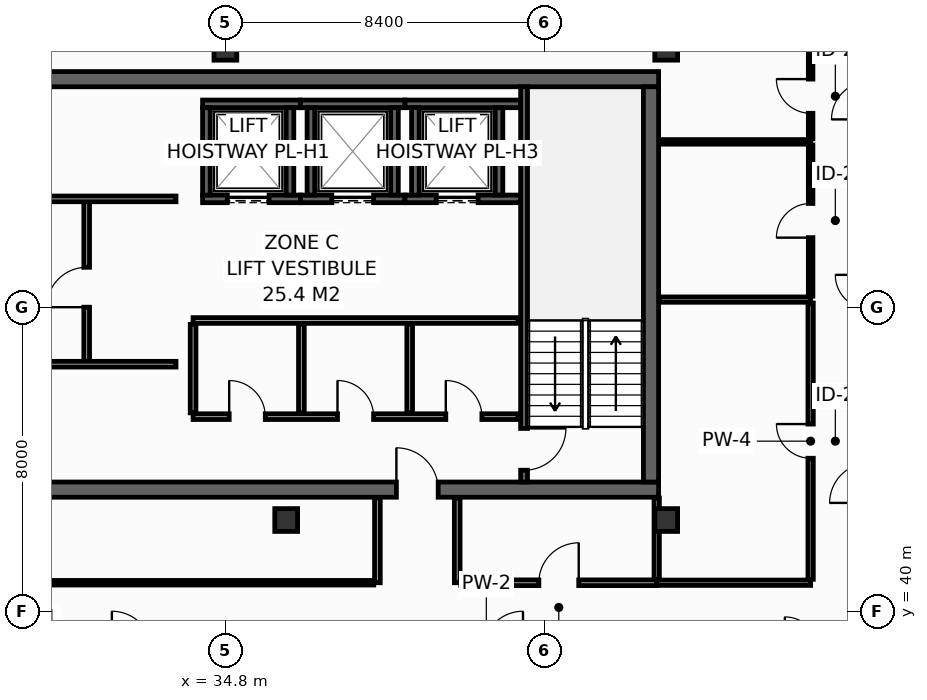
"""IFC4 building model, lengths in metres.
Left out: names, types, materials, properties, quantities, classifications, styles, units other than length and angle.
Written with IfcOpenShell. Run it as: python <this file> out.ifc"""

import sys

from ifc_helpers import new_model, si_unit, direction, frame, frame_2d, origin, origin_2d, place, context, subcontext, project, spatial, rectangle, hollow_rectangle, extrude, element, fill, save


model = new_model("IFC4")
c1 = context("Model", 3, precision=1e-05, world=origin(), true_north=direction((0.0, 1.0)))
c2 = subcontext(c1, "Body", "Model", "MODEL_VIEW")
j1 = project(units=[si_unit("LENGTHUNIT", "METRE"), si_unit("PLANEANGLEUNIT", "RADIAN")], contexts=[c1])
p1 = place(None, origin())
s1 = spatial("IfcSite", under=j1, at=p1, CompositionType="ELEMENT")
p2 = place(p1, origin())
s2 = spatial("IfcBuilding", under=s1, at=p2, CompositionType="ELEMENT")
p3 = place(p2, frame((0.0, 0.0, 268.6)))
s3 = spatial("IfcBuildingStorey", under=s2, at=p3, CompositionType="ELEMENT", Elevation=268.6)
p4 = place(p3, frame((13.7, 43.2, 0.0), z_axis=(0.0, 0.0, 1.0), x_axis=(1.0, 0.0, 0.0)))
e1 = element("IfcWall", 1, at=p4, inside=s3, PredefinedType="SHEAR", context=c2, shape_type="SweptSolid", body=[
    extrude(rectangle(XDim=32.5, YDim=0.4, at=frame_2d((16.25, 0.0))), origin(), (0.0, 0.0, 1.0), 3.55),
])
p5 = place(p4, frame((5.4, 0.0, 0.0)))
e2 = element("IfcOpeningElement", 2, at=p5, cuts=e1, PredefinedType="OPENING", context=c2, shape_type="SweptSolid", body=[
    extrude(rectangle(XDim=1.1, YDim=2.15, at=frame_2d((0.55, 1.075))), frame((0.0, 0.21, 0.0), z_axis=(0.0, -1.0, 0.0), x_axis=(1.0, 0.0, 0.0)), (0.0, 0.0, 1.0), 0.42),
])
p6 = place(p4, frame((25.6, 0.0, 0.0)))
e3 = element("IfcOpeningElement", 3, at=p6, cuts=e1, PredefinedType="OPENING", context=c2, shape_type="SweptSolid", body=[
    extrude(rectangle(XDim=1.1, YDim=2.15, at=frame_2d((0.55, 1.075))), frame((0.0, 0.21, 0.0), z_axis=(0.0, -1.0, 0.0), x_axis=(1.0, 0.0, 0.0)), (0.0, 0.0, 1.0), 0.42),
])
p7 = place(p3, frame((13.7, 54.0, 0.0), z_axis=(0.0, 0.0, 1.0), x_axis=(1.0, 0.0, 0.0)))
e4 = element("IfcWall", 4, at=p7, inside=s3, PredefinedType="SHEAR", context=c2, shape_type="SweptSolid", body=[
    extrude(rectangle(XDim=32.5, YDim=0.4, at=frame_2d((16.25, 0.0))), origin(), (0.0, 0.0, 1.0), 3.55),
])
p8 = place(p3, frame((46.0, 43.4, 0.0), z_axis=(0.0, 0.0, 1.0), x_axis=(0.0, 1.0, 0.0)))
e5 = element("IfcWall", 5, at=p8, inside=s3, PredefinedType="SHEAR", context=c2, shape_type="SweptSolid", body=[
    extrude(rectangle(XDim=10.4, YDim=0.4, at=frame_2d((5.2, 0.0))), origin(), (0.0, 0.0, 1.0), 3.55),
])
for number, where, z_axis, x_axis in (
    (6, (34.8, 54.8, 0.0), (0.0, 0.0, 1.0), (1.0, 0.0, 0.0)),
    (7, (46.4, 54.8, 0.0), (0.0, 0.0, 1.0), (1.0, 0.0, 0.0)),
    (8, (36.4, 42.4, 0.0), (0.0, 0.0, 1.0), (1.0, 0.0, 0.0)),
    (9, (46.4, 42.4, 0.0), (0.0, 0.0, 1.0), (1.0, 0.0, 0.0)),
):
    element("IfcColumn", number, at=place(p3, frame(where, z_axis=z_axis, x_axis=x_axis)), inside=s3, PredefinedType="COLUMN", context=c2, shape_type="SweptSolid", body=[
        extrude(hollow_rectangle(XDim=0.6, YDim=0.6, WallThickness=0.028, at=origin_2d()), origin(), (0.0, 0.0, 1.0), 3.8),
    ])
p9 = place(p3, frame((34.2, 50.85, 0.0), z_axis=(0.0, 0.0, 1.0), x_axis=(1.0, 0.0, 0.0)))
e10 = element("IfcWall", 10, at=p9, inside=s3, PredefinedType="SHEAR", context=c2, shape_type="SweptSolid", body=[
    extrude(rectangle(XDim=2.575, YDim=0.2, at=frame_2d((1.288, 0.0))), origin(), (0.0, 0.0, 1.0), 3.55),
])
p10 = place(p9, frame((0.65, 0.0, 0.0)))
e11 = element("IfcOpeningElement", 11, at=p10, cuts=e10, PredefinedType="OPENING", context=c2, shape_type="SweptSolid", body=[
    extrude(rectangle(XDim=1.1, YDim=2.2, at=frame_2d((0.55, 1.1))), frame((0.0, 0.11, 0.0), z_axis=(0.0, -1.0, 0.0), x_axis=(1.0, 0.0, 0.0)), (0.0, 0.0, 1.0), 0.22),
])
p11 = place(p3, frame((34.2, 53.35, 0.0), z_axis=(0.0, 0.0, 1.0), x_axis=(1.0, 0.0, 0.0)))
e12 = element("IfcWall", 12, at=p11, inside=s3, PredefinedType="SHEAR", context=c2, shape_type="SweptSolid", body=[
    extrude(rectangle(XDim=2.575, YDim=0.2, at=frame_2d((1.288, 0.0))), origin(), (0.0, 0.0, 1.0), 3.55),
])
for number, where, z_axis, x_axis in (
    (13, (34.3, 50.95, 0.0), (0.0, 0.0, 1.0), (0.0, 1.0, 0.0)),
    (14, (36.5, 50.95, 0.0), (0.0, 0.0, 1.0), (0.0, 1.0, 0.0)),
):
    element("IfcWall", number, at=place(p3, frame(where, z_axis=z_axis, x_axis=x_axis)), inside=s3, PredefinedType="SHEAR", context=c2, shape_type="SweptSolid", body=[
        extrude(rectangle(XDim=2.3, YDim=0.2, at=frame_2d((1.15, 0.0))), origin(), (0.0, 0.0, 1.0), 3.55),
    ])
p12 = place(p3, frame((36.775, 50.85, 0.0), z_axis=(0.0, 0.0, 1.0), x_axis=(1.0, 0.0, 0.0)))
e15 = element("IfcWall", 15, at=p12, inside=s3, PredefinedType="SHEAR", context=c2, shape_type="SweptSolid", body=[
    extrude(rectangle(XDim=2.75, YDim=0.2, at=frame_2d((1.375, 0.0))), origin(), (0.0, 0.0, 1.0), 3.55),
])
p13 = place(p12, frame((0.825, 0.0, 0.0)))
e16 = element("IfcOpeningElement", 16, at=p13, cuts=e15, PredefinedType="OPENING", context=c2, shape_type="SweptSolid", body=[
    extrude(rectangle(XDim=1.1, YDim=2.2, at=frame_2d((0.55, 1.1))), frame((0.0, 0.11, 0.0), z_axis=(0.0, -1.0, 0.0), x_axis=(1.0, 0.0, 0.0)), (0.0, 0.0, 1.0), 0.22),
])
p14 = place(p3, frame((36.775, 53.35, 0.0), z_axis=(0.0, 0.0, 1.0), x_axis=(1.0, 0.0, 0.0)))
e17 = element("IfcWall", 17, at=p14, inside=s3, PredefinedType="SHEAR", context=c2, shape_type="SweptSolid", body=[
    extrude(rectangle(XDim=2.75, YDim=0.2, at=frame_2d((1.375, 0.0))), origin(), (0.0, 0.0, 1.0), 3.55),
])
for number, where, z_axis, x_axis in (
    (18, (37.05, 50.95, 0.0), (0.0, 0.0, 1.0), (0.0, 1.0, 0.0)),
    (19, (39.25, 50.95, 0.0), (0.0, 0.0, 1.0), (0.0, 1.0, 0.0)),
):
    element("IfcWall", number, at=place(p3, frame(where, z_axis=z_axis, x_axis=x_axis)), inside=s3, PredefinedType="SHEAR", context=c2, shape_type="SweptSolid", body=[
        extrude(rectangle(XDim=2.3, YDim=0.2, at=frame_2d((1.15, 0.0))), origin(), (0.0, 0.0, 1.0), 3.55),
    ])
p15 = place(p3, frame((39.525, 50.85, 0.0), z_axis=(0.0, 0.0, 1.0), x_axis=(1.0, 0.0, 0.0)))
e20 = element("IfcWall", 20, at=p15, inside=s3, PredefinedType="SHEAR", context=c2, shape_type="SweptSolid", body=[
    extrude(rectangle(XDim=3.045, YDim=0.2, at=frame_2d((1.522, 0.0))), origin(), (0.0, 0.0, 1.0), 3.55),
])
p16 = place(p15, frame((0.825, 0.0, 0.0)))
e21 = element("IfcOpeningElement", 21, at=p16, cuts=e20, PredefinedType="OPENING", context=c2, shape_type="SweptSolid", body=[
    extrude(rectangle(XDim=1.1, YDim=2.2, at=frame_2d((0.55, 1.1))), frame((0.0, 0.11, 0.0), z_axis=(0.0, -1.0, 0.0), x_axis=(1.0, 0.0, 0.0)), (0.0, 0.0, 1.0), 0.22),
])
p17 = place(p3, frame((39.525, 53.35, 0.0), z_axis=(0.0, 0.0, 1.0), x_axis=(1.0, 0.0, 0.0)))
e22 = element("IfcWall", 22, at=p17, inside=s3, PredefinedType="SHEAR", context=c2, shape_type="SweptSolid", body=[
    extrude(rectangle(XDim=3.045, YDim=0.2, at=frame_2d((1.522, 0.0))), origin(), (0.0, 0.0, 1.0), 3.55),
])
for number, where, z_axis, x_axis in (
    (23, (39.8, 50.95, 0.0), (0.0, 0.0, 1.0), (0.0, 1.0, 0.0)),
    (24, (42.0, 50.95, 0.0), (0.0, 0.0, 1.0), (0.0, 1.0, 0.0)),
):
    element("IfcWall", number, at=place(p3, frame(where, z_axis=z_axis, x_axis=x_axis)), inside=s3, PredefinedType="SHEAR", context=c2, shape_type="SweptSolid", body=[
        extrude(rectangle(XDim=2.3, YDim=0.2, at=frame_2d((1.15, 0.0))), origin(), (0.0, 0.0, 1.0), 3.55),
    ])
p18 = place(p3, frame((42.66, 53.8, 0.0), z_axis=(0.0, 0.0, 1.0), x_axis=(0.0, -1.0, 0.0)))
e25 = element("IfcWall", 25, at=p18, inside=s3, PredefinedType="SHEAR", context=c2, shape_type="SweptSolid", body=[
    extrude(rectangle(XDim=10.4, YDim=0.18, at=frame_2d((5.2, 0.0))), origin(), (0.0, 0.0, 1.0), 3.55),
])
p19 = place(p18, frame((8.99, 0.0, 0.0)))
e26 = element("IfcOpeningElement", 26, at=p19, cuts=e25, PredefinedType="OPENING", context=c2, shape_type="SweptSolid", body=[
    extrude(rectangle(XDim=1.1, YDim=2.15, at=frame_2d((0.55, 1.075))), frame((0.0, 0.1, 0.0), z_axis=(0.0, -1.0, 0.0), x_axis=(1.0, 0.0, 0.0)), (0.0, 0.0, 1.0), 0.2),
])
p20 = place(p3, frame((31.15, 46.5, 0.0), z_axis=(0.0, 0.0, 1.0), x_axis=(0.0, 1.0, 0.0)))
e27 = element("IfcWall", 27, at=p20, inside=s3, PredefinedType="PARTITIONING", context=c2, shape_type="SweptSolid", body=[
    extrude(rectangle(XDim=4.35, YDim=0.15, at=frame_2d((2.175, 0.0))), origin(), (0.0, 0.0, 1.0), 3.55),
])
p21 = place(p20, frame((1.5, 0.0, 0.0)))
e28 = element("IfcOpeningElement", 28, at=p21, cuts=e27, PredefinedType="OPENING", context=c2, shape_type="SweptSolid", body=[
    extrude(rectangle(XDim=1.05, YDim=2.15, at=frame_2d((0.525, 1.075))), frame((0.0, 0.085, 0.0), z_axis=(0.0, -1.0, 0.0), x_axis=(1.0, 0.0, 0.0)), (0.0, 0.0, 1.0), 0.17),
])
p22 = place(p3, frame((33.95, 45.12, 0.0), z_axis=(0.0, 0.0, 1.0), x_axis=(1.0, 0.0, 0.0)))
e29 = element("IfcWall", 29, at=p22, inside=s3, PredefinedType="PARTITIONING", context=c2, shape_type="SweptSolid", body=[
    extrude(rectangle(XDim=8.55, YDim=0.15, at=frame_2d((4.275, 0.0))), origin(), (0.0, 0.0, 1.0), 3.55),
])
p23 = place(p22, frame((0.95, 0.0, 0.0)))
e30 = element("IfcOpeningElement", 30, at=p23, cuts=e29, PredefinedType="OPENING", context=c2, shape_type="SweptSolid", body=[
    extrude(rectangle(XDim=0.95, YDim=2.15, at=frame_2d((0.475, 1.075))), frame((0.0, 0.085, 0.0), z_axis=(0.0, -1.0, 0.0), x_axis=(1.0, 0.0, 0.0)), (0.0, 0.0, 1.0), 0.17),
])
p24 = place(p22, frame((3.8, 0.0, 0.0)))
e31 = element("IfcOpeningElement", 31, at=p24, cuts=e29, PredefinedType="OPENING", context=c2, shape_type="SweptSolid", body=[
    extrude(rectangle(XDim=0.95, YDim=2.15, at=frame_2d((0.475, 1.075))), frame((0.0, 0.085, 0.0), z_axis=(0.0, -1.0, 0.0), x_axis=(1.0, 0.0, 0.0)), (0.0, 0.0, 1.0), 0.17),
])
p25 = place(p22, frame((6.65, 0.0, 0.0)))
e32 = element("IfcOpeningElement", 32, at=p25, cuts=e29, PredefinedType="OPENING", context=c2, shape_type="SweptSolid", body=[
    extrude(rectangle(XDim=0.95, YDim=2.15, at=frame_2d((0.475, 1.075))), frame((0.0, 0.085, 0.0), z_axis=(0.0, -1.0, 0.0), x_axis=(1.0, 0.0, 0.0)), (0.0, 0.0, 1.0), 0.17),
])
p26 = place(p3, frame((33.95, 47.65, 0.0), z_axis=(0.0, 0.0, 1.0), x_axis=(1.0, 0.0, 0.0)))
e33 = element("IfcWall", 33, at=p26, inside=s3, PredefinedType="PARTITIONING", context=c2, shape_type="SweptSolid", body=[
    extrude(rectangle(XDim=8.55, YDim=0.15, at=frame_2d((4.275, 0.0))), origin(), (0.0, 0.0, 1.0), 3.55),
])
for number, where, z_axis, x_axis in (
    (34, (33.95, 45.22, 0.0), (0.0, 0.0, 1.0), (0.0, 1.0, 0.0)),
    (35, (36.8, 45.22, 0.0), (0.0, 0.0, 1.0), (0.0, 1.0, 0.0)),
    (36, (39.65, 45.22, 0.0), (0.0, 0.0, 1.0), (0.0, 1.0, 0.0)),
):
    element("IfcWall", number, at=place(p3, frame(where, z_axis=z_axis, x_axis=x_axis)), inside=s3, PredefinedType="PARTITIONING", context=c2, shape_type="SweptSolid", body=[
        extrude(rectangle(XDim=2.33, YDim=0.15, at=frame_2d((1.165, 0.0))), origin(), (0.0, 0.0, 1.0), 3.55),
    ])
p27 = place(p3, frame((25.85, 50.85, 0.0), z_axis=(0.0, 0.0, 1.0), x_axis=(1.0, 0.0, 0.0)))
e37 = element("IfcWall", 37, at=p27, inside=s3, PredefinedType="PARTITIONING", context=c2, shape_type="SweptSolid", body=[
    extrude(rectangle(XDim=7.65, YDim=0.15, at=frame_2d((3.825, 0.0))), origin(), (0.0, 0.0, 1.0), 3.55),
])
p28 = place(p27, frame((1.25, 0.0, 0.0)))
e38 = element("IfcOpeningElement", 38, at=p28, cuts=e37, PredefinedType="OPENING", context=c2, shape_type="SweptSolid", body=[
    extrude(rectangle(XDim=0.95, YDim=2.15, at=frame_2d((0.475, 1.075))), frame((0.0, 0.085, 0.0), z_axis=(0.0, -1.0, 0.0), x_axis=(1.0, 0.0, 0.0)), (0.0, 0.0, 1.0), 0.17),
])
p29 = place(p3, frame((25.85, 46.5, 0.0), z_axis=(0.0, 0.0, 1.0), x_axis=(1.0, 0.0, 0.0)))
e39 = element("IfcWall", 39, at=p29, inside=s3, PredefinedType="PARTITIONING", context=c2, shape_type="SweptSolid", body=[
    extrude(rectangle(XDim=7.65, YDim=0.15, at=frame_2d((3.825, 0.0))), origin(), (0.0, 0.0, 1.0), 3.55),
])
p30 = place(p29, frame((2.8, 0.0, 0.0)))
e40 = element("IfcOpeningElement", 40, at=p30, cuts=e39, PredefinedType="OPENING", context=c2, shape_type="SweptSolid", body=[
    extrude(rectangle(XDim=0.95, YDim=2.15, at=frame_2d((0.475, 1.075))), frame((0.0, 0.085, 0.0), z_axis=(0.0, -1.0, 0.0), x_axis=(1.0, 0.0, 0.0)), (0.0, 0.0, 1.0), 0.17),
])
p31 = place(p3, frame((46.15, 40.75, 0.0), z_axis=(0.0, 0.0, 1.0), x_axis=(1.0, 0.0, 0.0)))
e41 = element("IfcWall", 41, at=p31, inside=s3, PredefinedType="PARTITIONING", context=c2, shape_type="SweptSolid", body=[
    extrude(rectangle(XDim=4.05, YDim=0.14, at=frame_2d((2.025, 0.0))), origin(), (0.0, 0.0, 1.0), 3.55),
])
p32 = place(p3, frame((46.15, 40.84, 0.0), z_axis=(0.0, 0.0, 1.0), x_axis=(0.0, 1.0, 0.0)))
e42 = element("IfcWall", 42, at=p32, inside=s3, PredefinedType="PARTITIONING", context=c2, shape_type="SweptSolid", body=[
    extrude(rectangle(XDim=2.14, YDim=0.14, at=frame_2d((1.07, 0.0))), origin(), (0.0, 0.0, 1.0), 3.55),
])
p33 = place(p3, frame((46.22, 48.2, 0.0), z_axis=(0.0, 0.0, 1.0), x_axis=(1.0, 0.0, 0.0)))
e43 = element("IfcWall", 43, at=p33, inside=s3, PredefinedType="PARTITIONING", context=c2, shape_type="SweptSolid", body=[
    extrude(rectangle(XDim=3.98, YDim=0.14, at=frame_2d((1.99, 0.0))), origin(), (0.0, 0.0, 1.0), 3.55),
])
p34 = place(p3, frame((50.2, 40.84, 0.0), z_axis=(0.0, 0.0, 1.0), x_axis=(0.0, 1.0, 0.0)))
e44 = element("IfcWall", 44, at=p34, inside=s3, PredefinedType="PARTITIONING", context=c2, shape_type="SweptSolid", body=[
    extrude(rectangle(XDim=7.27, YDim=0.14, at=frame_2d((3.635, 0.0))), origin(), (0.0, 0.0, 1.0), 2.947),
])
p35 = place(p34, frame((3.185, 0.0, 0.0)))
e45 = element("IfcOpeningElement", 45, at=p35, cuts=e44, PredefinedType="OPENING", context=c2, shape_type="SweptSolid", body=[
    extrude(rectangle(XDim=0.9, YDim=2.1, at=frame_2d((0.45, 1.05))), frame((0.0, 0.08, 0.0), z_axis=(0.0, -1.0, 0.0), x_axis=(1.0, 0.0, 0.0)), (0.0, 0.0, 1.0), 0.16),
])
p36 = place(p3, frame((46.22, 52.35, 0.0), z_axis=(0.0, 0.0, 1.0), x_axis=(1.0, 0.0, 0.0)))
e46 = element("IfcWall", 46, at=p36, inside=s3, PredefinedType="PARTITIONING", context=c2, shape_type="SweptSolid", body=[
    extrude(rectangle(XDim=3.98, YDim=0.12, at=frame_2d((1.99, 0.0))), origin(), (0.0, 0.0, 1.0), 3.55),
])
p37 = place(p3, frame((50.2, 48.29, 0.0), z_axis=(0.0, 0.0, 1.0), x_axis=(0.0, 1.0, 0.0)))
e47 = element("IfcWall", 47, at=p37, inside=s3, PredefinedType="PARTITIONING", context=c2, shape_type="SweptSolid", body=[
    extrude(rectangle(XDim=3.98, YDim=0.12, at=frame_2d((1.99, 0.0))), origin(), (0.0, 0.0, 1.0), 3.55),
])
p38 = place(p37, frame((1.54, 0.0, 0.0)))
e48 = element("IfcOpeningElement", 48, at=p38, cuts=e47, PredefinedType="OPENING", context=c2, shape_type="SweptSolid", body=[
    extrude(rectangle(XDim=0.9, YDim=2.1, at=frame_2d((0.45, 1.05))), frame((0.0, 0.07, 0.0), z_axis=(0.0, -1.0, 0.0), x_axis=(1.0, 0.0, 0.0)), (0.0, 0.0, 1.0), 0.14),
])
p39 = place(p3, frame((50.2, 52.43, 0.0), z_axis=(0.0, 0.0, 1.0), x_axis=(0.0, 1.0, 0.0)))
e49 = element("IfcWall", 49, at=p39, inside=s3, PredefinedType="PARTITIONING", context=c2, shape_type="SweptSolid", body=[
    extrude(rectangle(XDim=3.565, YDim=0.12, at=frame_2d((1.783, 0.0))), origin(), (0.0, 0.0, 1.0), 2.935),
])
p40 = place(p39, frame((0.672, 0.0, 0.0)))
e50 = element("IfcOpeningElement", 50, at=p40, cuts=e49, PredefinedType="OPENING", context=c2, shape_type="SweptSolid", body=[
    extrude(rectangle(XDim=0.9, YDim=2.1, at=frame_2d((0.45, 1.05))), frame((0.0, 0.07, 0.0), z_axis=(0.0, -1.0, 0.0), x_axis=(1.0, 0.0, 0.0)), (0.0, 0.0, 1.0), 0.14),
])
for number, where, z_axis, x_axis in (
    (51, (38.8, 40.75, 0.0), (0.0, 0.0, 1.0), (0.0, 1.0, 0.0)),
    (52, (40.9, 40.75, 0.0), (0.0, 0.0, 1.0), (0.0, 1.0, 0.0)),
):
    element("IfcWall", number, at=place(p3, frame(where, z_axis=z_axis, x_axis=x_axis)), inside=s3, PredefinedType="PARTITIONING", context=c2, shape_type="SweptSolid", body=[
        extrude(rectangle(XDim=2.23, YDim=0.15, at=frame_2d((1.115, 0.0))), origin(), (0.0, 0.0, 1.0), 3.55),
    ])
p41 = place(p3, frame((20.795, 40.75, 0.0), z_axis=(0.0, 0.0, 1.0), x_axis=(1.0, 0.0, 0.0)))
e53 = element("IfcWall", 53, at=p41, inside=s3, PredefinedType="PARTITIONING", context=c2, shape_type="SweptSolid", body=[
    extrude(rectangle(XDim=17.91, YDim=0.12, at=frame_2d((8.955, 0.0))), origin(), (0.0, 0.0, 1.0), 2.947),
])
p42 = place(p41, frame((8.505, 0.0, 0.0)))
e54 = element("IfcOpeningElement", 54, at=p42, cuts=e53, PredefinedType="OPENING", context=c2, shape_type="SweptSolid", body=[
    extrude(rectangle(XDim=0.9, YDim=2.1, at=frame_2d((0.45, 1.05))), frame((0.0, 0.07, 0.0), z_axis=(0.0, -1.0, 0.0), x_axis=(1.0, 0.0, 0.0)), (0.0, 0.0, 1.0), 0.14),
])
p43 = place(p3, frame((40.995, 40.75, 0.0), z_axis=(0.0, 0.0, 1.0), x_axis=(1.0, 0.0, 0.0)))
e55 = element("IfcWall", 55, at=p43, inside=s3, PredefinedType="PARTITIONING", context=c2, shape_type="SweptSolid", body=[
    extrude(rectangle(XDim=5.155, YDim=0.15, at=frame_2d((2.577, 0.0))), origin(), (0.0, 0.0, 1.0), 3.55),
])
p44 = place(p43, frame((2.053, 0.0, 0.0)))
e56 = element("IfcOpeningElement", 56, at=p44, cuts=e55, PredefinedType="OPENING", context=c2, shape_type="SweptSolid", body=[
    extrude(rectangle(XDim=1.05, YDim=2.15, at=frame_2d((0.525, 1.075))), frame((0.0, 0.085, 0.0), z_axis=(0.0, -1.0, 0.0), x_axis=(1.0, 0.0, 0.0)), (0.0, 0.0, 1.0), 0.17),
])
p45 = place(p10, origin())
e57 = element("IfcDoor", 57, at=p45, inside=s3, OperationType="SLIDING_TO_LEFT", PredefinedType="DOOR", context=c2, shape_type="SweptSolid", body=[
    extrude(rectangle(XDim=1.1, YDim=2.2, at=frame_2d((0.55, 1.1))), frame((0.0, 0.025, 0.0), z_axis=(0.0, -1.0, 0.0), x_axis=(1.0, 0.0, 0.0)), (0.0, 0.0, 1.0), 0.05),
])
fill(e11, e57)
p46 = place(p13, origin())
e58 = element("IfcDoor", 58, at=p46, inside=s3, OperationType="SLIDING_TO_LEFT", PredefinedType="DOOR", context=c2, shape_type="SweptSolid", body=[
    extrude(rectangle(XDim=1.1, YDim=2.2, at=frame_2d((0.55, 1.1))), frame((0.0, 0.025, 0.0), z_axis=(0.0, -1.0, 0.0), x_axis=(1.0, 0.0, 0.0)), (0.0, 0.0, 1.0), 0.05),
])
fill(e16, e58)
p47 = place(p16, origin())
e59 = element("IfcDoor", 59, at=p47, inside=s3, OperationType="SLIDING_TO_LEFT", PredefinedType="DOOR", context=c2, shape_type="SweptSolid", body=[
    extrude(rectangle(XDim=1.1, YDim=2.2, at=frame_2d((0.55, 1.1))), frame((0.0, 0.025, 0.0), z_axis=(0.0, -1.0, 0.0), x_axis=(1.0, 0.0, 0.0)), (0.0, 0.0, 1.0), 0.05),
])
fill(e21, e59)
p48 = place(p19, origin())
e60 = element("IfcDoor", 60, at=p48, inside=s3, OperationType="SINGLE_SWING_LEFT", PredefinedType="DOOR", context=c2, shape_type="SweptSolid", body=[
    extrude(rectangle(XDim=1.1, YDim=2.15, at=frame_2d((0.55, 1.075))), frame((0.0, 0.025, 0.0), z_axis=(0.0, -1.0, 0.0), x_axis=(1.0, 0.0, 0.0)), (0.0, 0.0, 1.0), 0.05),
])
fill(e26, e60)
p49 = place(p6, origin())
e61 = element("IfcDoor", 61, at=p49, inside=s3, OperationType="SINGLE_SWING_LEFT", PredefinedType="DOOR", context=c2, shape_type="SweptSolid", body=[
    extrude(rectangle(XDim=1.1, YDim=2.15, at=frame_2d((0.55, 1.075))), frame((0.0, 0.025, 0.0), z_axis=(0.0, -1.0, 0.0), x_axis=(1.0, 0.0, 0.0)), (0.0, 0.0, 1.0), 0.05),
])
fill(e3, e61)
p50 = place(p21, origin())
e62 = element("IfcDoor", 62, at=p50, inside=s3, OperationType="SINGLE_SWING_LEFT", PredefinedType="DOOR", context=c2, shape_type="SweptSolid", body=[
    extrude(rectangle(XDim=1.05, YDim=2.15, at=frame_2d((0.525, 1.075))), frame((0.0, 0.025, 0.0), z_axis=(0.0, -1.0, 0.0), x_axis=(1.0, 0.0, 0.0)), (0.0, 0.0, 1.0), 0.05),
])
fill(e28, e62)
p51 = place(p23, origin())
e63 = element("IfcDoor", 63, at=p51, inside=s3, OperationType="SINGLE_SWING_LEFT", PredefinedType="DOOR", context=c2, shape_type="SweptSolid", body=[
    extrude(rectangle(XDim=0.95, YDim=2.15, at=frame_2d((0.475, 1.075))), frame((0.0, 0.025, 0.0), z_axis=(0.0, -1.0, 0.0), x_axis=(1.0, 0.0, 0.0)), (0.0, 0.0, 1.0), 0.05),
])
fill(e30, e63)
p52 = place(p24, origin())
e64 = element("IfcDoor", 64, at=p52, inside=s3, OperationType="SINGLE_SWING_LEFT", PredefinedType="DOOR", context=c2, shape_type="SweptSolid", body=[
    extrude(rectangle(XDim=0.95, YDim=2.15, at=frame_2d((0.475, 1.075))), frame((0.0, 0.025, 0.0), z_axis=(0.0, -1.0, 0.0), x_axis=(1.0, 0.0, 0.0)), (0.0, 0.0, 1.0), 0.05),
])
fill(e31, e64)
p53 = place(p25, origin())
e65 = element("IfcDoor", 65, at=p53, inside=s3, OperationType="SINGLE_SWING_LEFT", PredefinedType="DOOR", context=c2, shape_type="SweptSolid", body=[
    extrude(rectangle(XDim=0.95, YDim=2.15, at=frame_2d((0.475, 1.075))), frame((0.0, 0.025, 0.0), z_axis=(0.0, -1.0, 0.0), x_axis=(1.0, 0.0, 0.0)), (0.0, 0.0, 1.0), 0.05),
])
fill(e32, e65)
p54 = place(p35, origin())
e66 = element("IfcDoor", 66, at=p54, inside=s3, OperationType="SINGLE_SWING_RIGHT", PredefinedType="DOOR", context=c2, shape_type="SweptSolid", body=[
    extrude(rectangle(XDim=0.9, YDim=2.1, at=frame_2d((0.45, 1.05))), frame((0.0, 0.025, 0.0), z_axis=(0.0, -1.0, 0.0), x_axis=(1.0, 0.0, 0.0)), (0.0, 0.0, 1.0), 0.05),
])
fill(e45, e66)
p55 = place(p38, origin())
e67 = element("IfcDoor", 67, at=p55, inside=s3, OperationType="SINGLE_SWING_LEFT", PredefinedType="DOOR", context=c2, shape_type="SweptSolid", body=[
    extrude(rectangle(XDim=0.9, YDim=2.1, at=frame_2d((0.45, 1.05))), frame((0.0, 0.025, 0.0), z_axis=(0.0, -1.0, 0.0), x_axis=(1.0, 0.0, 0.0)), (0.0, 0.0, 1.0), 0.05),
])
fill(e48, e67)
p56 = place(p40, origin())
e68 = element("IfcDoor", 68, at=p56, inside=s3, OperationType="SINGLE_SWING_RIGHT", PredefinedType="DOOR", context=c2, shape_type="SweptSolid", body=[
    extrude(rectangle(XDim=0.9, YDim=2.1, at=frame_2d((0.45, 1.05))), frame((0.0, 0.025, 0.0), z_axis=(0.0, -1.0, 0.0), x_axis=(1.0, 0.0, 0.0)), (0.0, 0.0, 1.0), 0.05),
])
fill(e50, e68)
p57 = place(p44, origin())
e69 = element("IfcDoor", 69, at=p57, inside=s3, OperationType="SINGLE_SWING_RIGHT", PredefinedType="DOOR", context=c2, shape_type="SweptSolid", body=[
    extrude(rectangle(XDim=1.05, YDim=2.15, at=frame_2d((0.525, 1.075))), frame((0.0, 0.025, 0.0), z_axis=(0.0, -1.0, 0.0), x_axis=(1.0, 0.0, 0.0)), (0.0, 0.0, 1.0), 0.05),
])
fill(e56, e69)
save(model, sys.argv[1])
